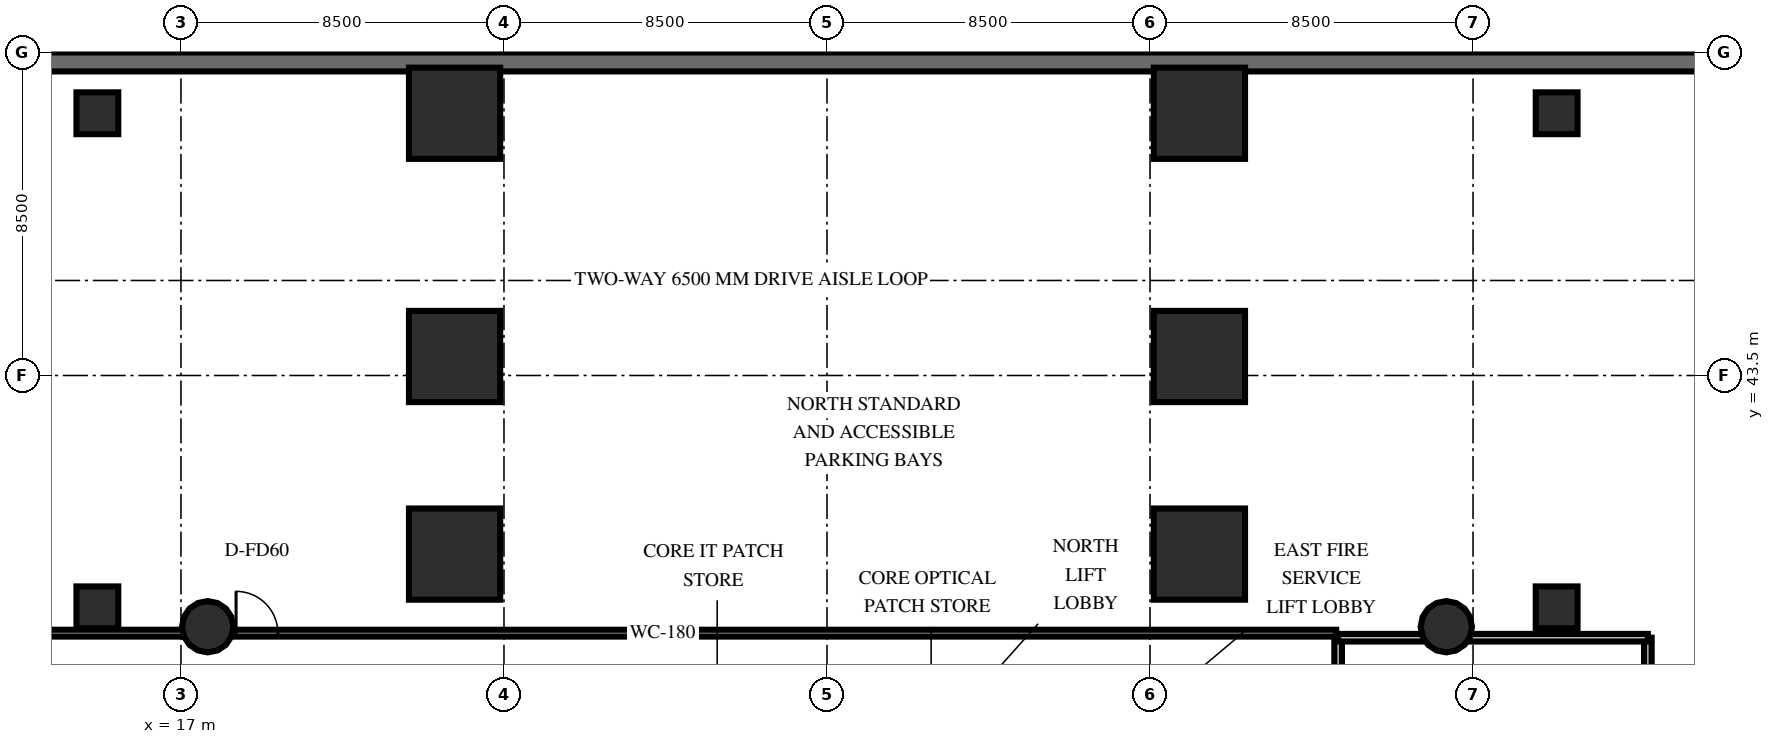
"""IFC4 building model, lengths in metres.
Left out: names, types, materials, properties, quantities, classifications, styles, units other than length and angle.
Written with IfcOpenShell. Run it as: python <this file> out.ifc"""

import sys

from ifc_helpers import new_model, si_unit, direction, frame, frame_2d, origin, origin_2d, place, context, subcontext, project, spatial, rectangle, circle, extrude, element, fill, save


model = new_model("IFC4")
c1 = context("Model", 3, precision=1e-05, world=origin(), true_north=direction((0.0, 1.0)))
c2 = subcontext(c1, "Body", "Model", "MODEL_VIEW")
j1 = project(units=[si_unit("LENGTHUNIT", "METRE"), si_unit("PLANEANGLEUNIT", "RADIAN")], contexts=[c1])
p1 = place(None, origin())
s1 = spatial("IfcSite", under=j1, at=p1, CompositionType="ELEMENT")
p2 = place(p1, origin())
s2 = spatial("IfcBuilding", under=s1, at=p2, CompositionType="ELEMENT")
p3 = place(p2, frame((0.0, 0.0, -9.6)))
s3 = spatial("IfcBuildingStorey", under=s2, at=p3, CompositionType="ELEMENT", Elevation=-9.6)
p4 = place(p3, frame((67.75, 51.75, 0.0), z_axis=(0.0, 0.0, 1.0), x_axis=(-1.0, 0.0, 0.0)))
e1 = element("IfcWall", 1, at=p4, inside=s3, PredefinedType="SOLIDWALL", context=c2, shape_type="SweptSolid", body=[
    extrude(rectangle(XDim=67.5, YDim=0.5, at=frame_2d((33.75, 0.0))), origin(), (0.0, 0.0, 1.0), 4.8),
])
for number, where, z_axis, x_axis in (
    (2, (24.2, 38.8, 0.0), (0.0, 0.0, 1.0), (1.0, 0.0, 0.0)),
    (3, (24.2, 44.0, 0.0), (0.0, 0.0, 1.0), (1.0, 0.0, 0.0)),
    (4, (24.2, 50.4, 0.0), (0.0, 0.0, 1.0), (1.0, 0.0, 0.0)),
    (5, (43.8, 38.8, 0.0), (0.0, 0.0, 1.0), (1.0, 0.0, 0.0)),
    (6, (43.8, 44.0, 0.0), (0.0, 0.0, 1.0), (1.0, 0.0, 0.0)),
    (7, (43.8, 50.4, 0.0), (0.0, 0.0, 1.0), (1.0, 0.0, 0.0)),
):
    element("IfcColumn", number, at=place(p3, frame(where, z_axis=z_axis, x_axis=x_axis)), inside=s3, PredefinedType="USERDEFINED", context=c2, shape_type="SweptSolid", body=[
        extrude(rectangle(XDim=2.4, YDim=2.4, at=origin_2d()), origin(), (0.0, 0.0, 1.0), 4.8),
    ])
for number, where, z_axis, x_axis in (
    (8, (14.8, 37.4, 0.0), (0.0, 0.0, 1.0), (1.0, 0.0, 0.0)),
    (9, (14.8, 50.4, 0.0), (0.0, 0.0, 1.0), (1.0, 0.0, 0.0)),
    (10, (53.2, 37.4, 0.0), (0.0, 0.0, 1.0), (1.0, 0.0, 0.0)),
    (11, (53.2, 50.4, 0.0), (0.0, 0.0, 1.0), (1.0, 0.0, 0.0)),
):
    element("IfcColumn", number, at=place(p3, frame(where, z_axis=z_axis, x_axis=x_axis)), inside=s3, PredefinedType="COLUMN", context=c2, shape_type="SweptSolid", body=[
        extrude(rectangle(XDim=1.1, YDim=1.1, at=origin_2d()), origin(), (0.0, 0.0, 1.0), 4.8),
    ])
for number, where, z_axis, x_axis in (
    (12, (50.297, 36.889, 0.0), (0.0, 0.0, 1.0), (1.0, 0.0, 0.0)),
    (13, (17.703, 36.889, 0.0), (0.0, 0.0, 1.0), (1.0, 0.0, 0.0)),
):
    element("IfcColumn", number, at=place(p3, frame(where, z_axis=z_axis, x_axis=x_axis)), inside=s3, PredefinedType="COLUMN", context=c2, shape_type="SweptSolid", body=[
        extrude(circle(Radius=0.675, at=origin_2d()), origin(), (0.0, 0.0, 1.0), 4.8),
    ])
p5 = place(p3, frame((11.95, 36.72, 0.0), z_axis=(0.0, 0.0, 1.0), x_axis=(1.0, 0.0, 0.0)))
e14 = element("IfcWall", 14, at=p5, inside=s3, PredefinedType="PARTITIONING", context=c2, shape_type="SweptSolid", body=[
    extrude(rectangle(XDim=35.45, YDim=0.18, at=frame_2d((17.725, 0.0))), origin(), (0.0, 0.0, 1.0), 3.56),
])
p6 = place(p5, frame((6.5, 0.0, 0.0)))
e15 = element("IfcOpeningElement", 15, at=p6, cuts=e14, PredefinedType="OPENING", context=c2, shape_type="SweptSolid", body=[
    extrude(rectangle(XDim=1.1, YDim=2.15, at=frame_2d((0.55, 1.075))), frame((0.0, 0.1, 0.0), z_axis=(0.0, -1.0, 0.0), x_axis=(1.0, 0.0, 0.0)), (0.0, 0.0, 1.0), 0.2),
])
p7 = place(p3, frame((47.45, 36.6, 0.0), z_axis=(0.0, 0.0, 1.0), x_axis=(0.0, -1.0, 0.0)))
e16 = element("IfcWall", 16, at=p7, inside=s3, PredefinedType="SOLIDWALL", context=c2, shape_type="SweptSolid", body=[
    extrude(rectangle(XDim=23.6, YDim=0.2, at=frame_2d((11.8, 0.0))), origin(), (0.0, 0.0, 1.0), 3.56),
])
p8 = place(p7, frame((11.275, 0.0, 0.0)))
e17 = element("IfcOpeningElement", 17, at=p8, cuts=e16, PredefinedType="OPENING", context=c2, shape_type="SweptSolid", body=[
    extrude(rectangle(XDim=1.05, YDim=2.15, at=frame_2d((0.525, 1.075))), frame((0.0, 0.11, 0.0), z_axis=(0.0, -1.0, 0.0), x_axis=(1.0, 0.0, 0.0)), (0.0, 0.0, 1.0), 0.22),
])
p9 = place(p3, frame((55.6, 13.0, 0.0), z_axis=(0.0, 0.0, 1.0), x_axis=(0.0, 1.0, 0.0)))
e18 = element("IfcWall", 18, at=p9, inside=s3, PredefinedType="SOLIDWALL", context=c2, shape_type="SweptSolid", body=[
    extrude(rectangle(XDim=23.6, YDim=0.2, at=frame_2d((11.8, 0.0))), origin(), (0.0, 0.0, 1.0), 3.56),
])
p10 = place(p3, frame((55.6, 36.6, 0.0), z_axis=(0.0, 0.0, 1.0), x_axis=(-1.0, 0.0, 0.0)))
e19 = element("IfcWall", 19, at=p10, inside=s3, PredefinedType="SOLIDWALL", context=c2, shape_type="SweptSolid", body=[
    extrude(rectangle(XDim=8.15, YDim=0.2, at=frame_2d((4.075, 0.0))), origin(), (0.0, 0.0, 1.0), 3.56),
])
p11 = place(p6, origin())
e20 = element("IfcDoor", 20, at=p11, inside=s3, OperationType="SINGLE_SWING_LEFT", PredefinedType="DOOR", context=c2, shape_type="SweptSolid", body=[
    extrude(rectangle(XDim=1.1, YDim=2.15, at=frame_2d((0.55, 1.075))), frame((0.0, 0.025, 0.0), z_axis=(0.0, -1.0, 0.0), x_axis=(1.0, 0.0, 0.0)), (0.0, 0.0, 1.0), 0.05),
])
fill(e15, e20)
save(model, sys.argv[1])
